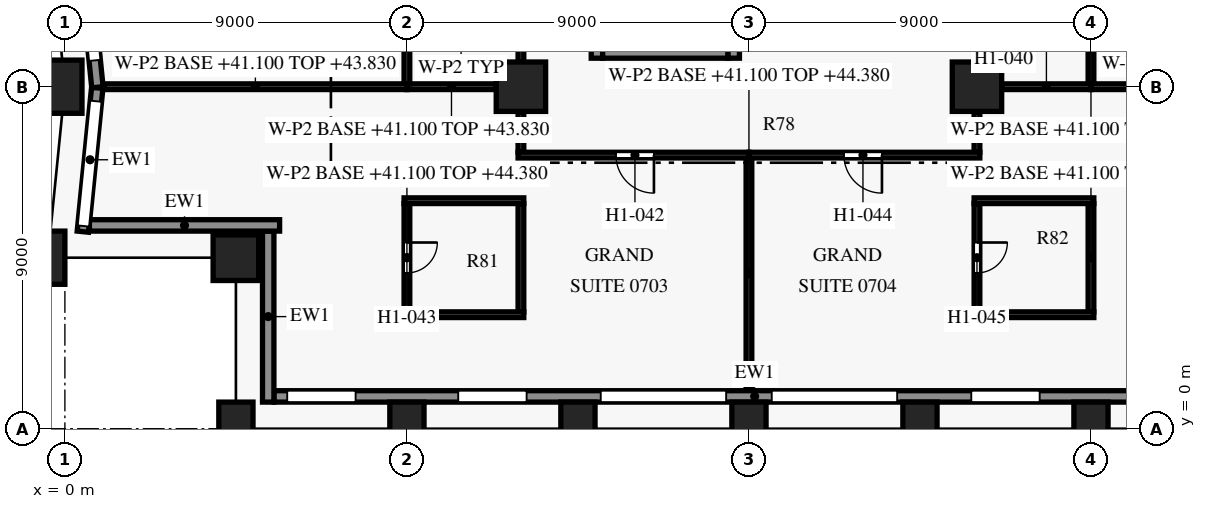
"""IFC4 building model, lengths in metres.
Left out: names, types, materials, properties, quantities, classifications, styles, units other than length and angle.
Written with IfcOpenShell. Run it as: python <this file> out.ifc"""

import sys

from ifc_helpers import new_model, si_unit, direction, frame, frame_2d, origin, origin_2d, place, context, subcontext, project, spatial, rectangle, extrude, element, fill, save


model = new_model("IFC4")
c1 = context("Model", 3, precision=1e-05, world=origin(), true_north=direction((0.0, 1.0)))
c2 = subcontext(c1, "Body", "Model", "MODEL_VIEW")
j1 = project(units=[si_unit("LENGTHUNIT", "METRE"), si_unit("PLANEANGLEUNIT", "RADIAN")], contexts=[c1])
p1 = place(None, origin())
s1 = spatial("IfcSite", under=j1, at=p1, CompositionType="ELEMENT")
p2 = place(p1, origin())
s2 = spatial("IfcBuilding", under=s1, at=p2, CompositionType="ELEMENT")
p3 = place(p2, frame((0.0, 0.0, 41.1)))
s3 = spatial("IfcBuildingStorey", under=s2, at=p3, CompositionType="ELEMENT", Elevation=41.1)
for number, where, z_axis, x_axis in (
    (1, (4.5, 0.0, 0.0), (0.0, 0.0, 1.0), (1.0, 0.0, 0.0)),
    (2, (9.0, 0.0, 0.0), (0.0, 0.0, 1.0), (1.0, 0.0, 0.0)),
    (3, (13.5, 0.0, 0.0), (0.0, 0.0, 1.0), (1.0, 0.0, 0.0)),
    (4, (18.0, 0.0, 0.0), (0.0, 0.0, 1.0), (1.0, 0.0, 0.0)),
    (5, (22.5, 0.0, 0.0), (0.0, 0.0, 1.0), (1.0, 0.0, 0.0)),
    (6, (27.0, 0.0, 0.0), (0.0, 0.0, 1.0), (1.0, 0.0, 0.0)),
    (7, (0.0, 9.0, 0.0), (0.0, 0.0, 1.0), (0.0, -1.0, 0.0)),
    (8, (-0.45, 4.5, 0.0), (0.0, 0.0, 1.0), (-0.1, -0.995, 0.0)),
):
    element("IfcColumn", number, at=place(p3, frame(where, z_axis=z_axis, x_axis=x_axis)), inside=s3, PredefinedType="COLUMN", context=c2, shape_type="SweptSolid", body=[
        extrude(rectangle(XDim=0.9, YDim=1.4, at=origin_2d()), origin(), (0.0, 0.0, 1.0), 3.6),
    ])
p4 = place(p3, frame((4.5, 4.5, 0.0), z_axis=(0.0, 0.0, 1.0), x_axis=(1.0, 0.0, 0.0)))
e9 = element("IfcColumn", 9, at=p4, inside=s3, PredefinedType="COLUMN", context=c2, shape_type="SweptSolid", body=[
    extrude(rectangle(XDim=1.2, YDim=1.2, at=origin_2d()), origin(), (0.0, 0.0, 1.0), 3.6),
])
for number, where, z_axis, x_axis in (
    (10, (12.0, 9.0, 0.0), (0.0, 0.0, 1.0), (1.0, 0.0, 0.0)),
    (11, (24.0, 9.0, 0.0), (0.0, 0.0, 1.0), (1.0, 0.0, 0.0)),
):
    element("IfcColumn", number, at=place(p3, frame(where, z_axis=z_axis, x_axis=x_axis)), inside=s3, PredefinedType="COLUMN", context=c2, shape_type="SweptSolid", body=[
        extrude(rectangle(XDim=1.3, YDim=1.3, at=origin_2d()), origin(), (0.0, 0.0, 1.0), 3.6),
    ])
p5 = place(p3, frame((30.8, 0.85, 0.0), z_axis=(0.0, 0.0, 1.0), x_axis=(-1.0, 0.0, 0.0)))
e12 = element("IfcWall", 12, at=p5, inside=s3, PredefinedType="SOLIDWALL", context=c2, shape_type="SweptSolid", body=[
    extrude(rectangle(XDim=25.3, YDim=0.3, at=frame_2d((12.65, 0.0))), origin(), (0.0, 0.0, 1.0), 2.95),
])
p6 = place(p5, frame((0.65, 0.0, 0.75)))
e13 = element("IfcOpeningElement", 13, at=p6, cuts=e12, PredefinedType="OPENING", context=c2, shape_type="SweptSolid", body=[
    extrude(rectangle(XDim=1.8, YDim=1.8, at=frame_2d((0.9, 0.9))), frame((0.0, 0.16, 0.0), z_axis=(0.0, -1.0, 0.0), x_axis=(1.0, 0.0, 0.0)), (0.0, 0.0, 1.0), 0.32),
])
p7 = place(p5, frame((5.15, 0.0, 0.75)))
e14 = element("IfcOpeningElement", 14, at=p7, cuts=e12, PredefinedType="OPENING", context=c2, shape_type="SweptSolid", body=[
    extrude(rectangle(XDim=1.8, YDim=1.8, at=frame_2d((0.9, 0.9))), frame((0.0, 0.16, 0.0), z_axis=(0.0, -1.0, 0.0), x_axis=(1.0, 0.0, 0.0)), (0.0, 0.0, 1.0), 0.32),
])
p8 = place(p5, frame((8.9, 0.0, 0.15)))
e15 = element("IfcOpeningElement", 15, at=p8, cuts=e12, PredefinedType="OPENING", context=c2, shape_type="SweptSolid", body=[
    extrude(rectangle(XDim=3.3, YDim=2.4, at=frame_2d((1.65, 1.2))), frame((0.0, 0.16, 0.0), z_axis=(0.0, -1.0, 0.0), x_axis=(1.0, 0.0, 0.0)), (0.0, 0.0, 1.0), 0.32),
])
p9 = place(p5, frame((13.4, 0.0, 0.15)))
e16 = element("IfcOpeningElement", 16, at=p9, cuts=e12, PredefinedType="OPENING", context=c2, shape_type="SweptSolid", body=[
    extrude(rectangle(XDim=3.3, YDim=2.4, at=frame_2d((1.65, 1.2))), frame((0.0, 0.16, 0.0), z_axis=(0.0, -1.0, 0.0), x_axis=(1.0, 0.0, 0.0)), (0.0, 0.0, 1.0), 0.32),
])
p10 = place(p5, frame((18.65, 0.0, 0.75)))
e17 = element("IfcOpeningElement", 17, at=p10, cuts=e12, PredefinedType="OPENING", context=c2, shape_type="SweptSolid", body=[
    extrude(rectangle(XDim=1.8, YDim=1.8, at=frame_2d((0.9, 0.9))), frame((0.0, 0.16, 0.0), z_axis=(0.0, -1.0, 0.0), x_axis=(1.0, 0.0, 0.0)), (0.0, 0.0, 1.0), 0.32),
])
p11 = place(p5, frame((23.15, 0.0, 0.75)))
e18 = element("IfcOpeningElement", 18, at=p11, cuts=e12, PredefinedType="OPENING", context=c2, shape_type="SweptSolid", body=[
    extrude(rectangle(XDim=1.8, YDim=1.8, at=frame_2d((0.9, 0.9))), frame((0.0, 0.16, 0.0), z_axis=(0.0, -1.0, 0.0), x_axis=(1.0, 0.0, 0.0)), (0.0, 0.0, 1.0), 0.32),
])
p12 = place(p3, frame((0.856, 8.985, 0.0), z_axis=(0.0, 0.0, 1.0), x_axis=(-0.099495688264, 0.995037993253, 0.0)))
e19 = element("IfcWall", 19, at=p12, inside=s3, PredefinedType="SOLIDWALL", context=c2, shape_type="SweptSolid", body=[
    extrude(rectangle(XDim=9.03, YDim=0.3, at=frame_2d((4.515, 0.0))), origin(), (0.0, 0.0, 1.0), 2.95),
])
p13 = place(p12, frame((0.711, 0.0, 0.15)))
e20 = element("IfcOpeningElement", 20, at=p13, cuts=e19, PredefinedType="OPENING", context=c2, shape_type="SweptSolid", body=[
    extrude(rectangle(XDim=3.3, YDim=2.4, at=frame_2d((1.65, 1.2))), frame((0.0, 0.16, 0.0), z_axis=(0.0, -1.0, 0.0), x_axis=(1.0, 0.0, 0.0)), (0.0, 0.0, 1.0), 0.32),
])
p14 = place(p12, frame((5.984, 0.0, 0.75)))
e21 = element("IfcOpeningElement", 21, at=p14, cuts=e19, PredefinedType="OPENING", context=c2, shape_type="SweptSolid", body=[
    extrude(rectangle(XDim=1.8, YDim=1.8, at=frame_2d((0.9, 0.9))), frame((0.0, 0.16, 0.0), z_axis=(0.0, -1.0, 0.0), x_axis=(1.0, 0.0, 0.0)), (0.0, 0.0, 1.0), 0.32),
])
p15 = place(p3, frame((0.473, 5.185, 0.0), z_axis=(0.0, 0.0, 1.0), x_axis=(0.099541845169, 0.995033376857, 0.0)))
e22 = element("IfcWall", 22, at=p15, inside=s3, PredefinedType="SOLIDWALL", context=c2, shape_type="SweptSolid", body=[
    extrude(rectangle(XDim=3.804, YDim=0.3, at=frame_2d((1.902, 0.0))), origin(), (0.0, 0.0, 1.0), 2.95),
])
p16 = place(p15, frame((0.15, 0.0, 0.15)))
e23 = element("IfcOpeningElement", 23, at=p16, cuts=e22, PredefinedType="OPENING", context=c2, shape_type="SweptSolid", body=[
    extrude(rectangle(XDim=3.3, YDim=2.4, at=frame_2d((1.65, 1.2))), frame((0.0, 0.16, 0.0), z_axis=(0.0, -1.0, 0.0), x_axis=(1.0, 0.0, 0.0)), (0.0, 0.0, 1.0), 0.32),
])
p17 = place(p3, frame((5.65, 5.35, 0.0), z_axis=(0.0, 0.0, 1.0), x_axis=(-1.0, 0.0, 0.0)))
e24 = element("IfcWall", 24, at=p17, inside=s3, PredefinedType="SOLIDWALL", context=c2, shape_type="SweptSolid", body=[
    extrude(rectangle(XDim=5.005, YDim=0.3, at=frame_2d((2.502, 0.0))), origin(), (0.0, 0.0, 1.0), 2.95),
])
p18 = place(p3, frame((5.35, 0.7, 0.0), z_axis=(0.0, 0.0, 1.0), x_axis=(0.0, 1.0, 0.0)))
e25 = element("IfcWall", 25, at=p18, inside=s3, PredefinedType="SOLIDWALL", context=c2, shape_type="SweptSolid", body=[
    extrude(rectangle(XDim=4.5, YDim=0.3, at=frame_2d((2.25, 0.0))), origin(), (0.0, 0.0, 1.0), 2.95),
])
p19 = place(p3, frame((14.15, 9.9, 0.0), z_axis=(0.0, 0.0, 1.0), x_axis=(1.0, 0.0, 0.0)))
e26 = element("IfcWall", 26, at=p19, inside=s3, PredefinedType="SHEAR", context=c2, shape_type="SweptSolid", body=[
    extrude(rectangle(XDim=3.3, YDim=0.3, at=frame_2d((1.65, 0.0))), origin(), (0.0, 0.0, 1.0), 3.3),
])
p20 = place(p3, frame((14.0, 9.75, 0.0), z_axis=(0.0, 0.0, 1.0), x_axis=(0.0, 1.0, 0.0)))
e27 = element("IfcWall", 27, at=p20, inside=s3, PredefinedType="SHEAR", context=c2, shape_type="SweptSolid", body=[
    extrude(rectangle(XDim=8.3, YDim=0.3, at=frame_2d((4.15, 0.0))), origin(), (0.0, 0.0, 1.0), 3.3),
])
p21 = place(p3, frame((17.6, 9.75, 0.0), z_axis=(0.0, 0.0, 1.0), x_axis=(0.0, 1.0, 0.0)))
e28 = element("IfcWall", 28, at=p21, inside=s3, PredefinedType="SHEAR", context=c2, shape_type="SweptSolid", body=[
    extrude(rectangle(XDim=8.3, YDim=0.3, at=frame_2d((4.15, 0.0))), origin(), (0.0, 0.0, 1.0), 3.3),
])
p22 = place(p21, frame((0.65, 0.0, 0.0)))
e29 = element("IfcOpeningElement", 29, at=p22, cuts=e28, PredefinedType="OPENING", context=c2, shape_type="SweptSolid", body=[
    extrude(rectangle(XDim=1.2, YDim=2.2, at=frame_2d((0.6, 1.1))), frame((0.0, 0.16, 0.0), z_axis=(0.0, -1.0, 0.0), x_axis=(1.0, 0.0, 0.0)), (0.0, 0.0, 1.0), 0.32),
])
for number, where, z_axis, x_axis in (
    (30, (8.925, 3.0, 0.0), (0.0, 0.0, 1.0), (1.0, 0.0, 0.0)),
    (31, (23.925, 3.0, 0.0), (0.0, 0.0, 1.0), (1.0, 0.0, 0.0)),
):
    element("IfcWall", number, at=place(p3, frame(where, z_axis=z_axis, x_axis=x_axis)), inside=s3, PredefinedType="PARTITIONING", context=c2, shape_type="SweptSolid", body=[
        extrude(rectangle(XDim=3.15, YDim=0.15, at=frame_2d((1.575, 0.0))), origin(), (0.0, 0.0, 1.0), 2.58),
    ])
p23 = place(p3, frame((12.0, 3.075, 0.0), z_axis=(0.0, 0.0, 1.0), x_axis=(0.0, 1.0, 0.0)))
e32 = element("IfcWall", 32, at=p23, inside=s3, PredefinedType="PARTITIONING", context=c2, shape_type="SweptSolid", body=[
    extrude(rectangle(XDim=2.85, YDim=0.15, at=frame_2d((1.425, 0.0))), origin(), (0.0, 0.0, 1.0), 2.58),
])
p24 = place(p3, frame((27.0, 3.075, 0.0), z_axis=(0.0, 0.0, 1.0), x_axis=(0.0, 1.0, 0.0)))
e33 = element("IfcWall", 33, at=p24, inside=s3, PredefinedType="PARTITIONING", context=c2, shape_type="SweptSolid", body=[
    extrude(rectangle(XDim=2.85, YDim=0.15, at=frame_2d((1.425, 0.0))), origin(), (0.0, 0.0, 1.0), 3.28),
])
p25 = place(p3, frame((9.0, 5.925, 0.0), z_axis=(0.0, 0.0, 1.0), x_axis=(0.0, -1.0, 0.0)))
e34 = element("IfcWall", 34, at=p25, inside=s3, PredefinedType="PARTITIONING", context=c2, shape_type="SweptSolid", body=[
    extrude(rectangle(XDim=2.85, YDim=0.15, at=frame_2d((1.425, 0.0))), origin(), (0.0, 0.0, 1.0), 3.28),
])
p26 = place(p25, frame((1.025, 0.0, 0.0)))
e35 = element("IfcOpeningElement", 35, at=p26, cuts=e34, PredefinedType="OPENING", context=c2, shape_type="SweptSolid", body=[
    extrude(rectangle(XDim=0.8, YDim=2.1, at=frame_2d((0.4, 1.05))), frame((0.0, 0.085, 0.0), z_axis=(0.0, -1.0, 0.0), x_axis=(1.0, 0.0, 0.0)), (0.0, 0.0, 1.0), 0.17),
])
p27 = place(p3, frame((24.0, 5.925, 0.0), z_axis=(0.0, 0.0, 1.0), x_axis=(0.0, -1.0, 0.0)))
e36 = element("IfcWall", 36, at=p27, inside=s3, PredefinedType="PARTITIONING", context=c2, shape_type="SweptSolid", body=[
    extrude(rectangle(XDim=2.85, YDim=0.15, at=frame_2d((1.425, 0.0))), origin(), (0.0, 0.0, 1.0), 2.58),
])
p28 = place(p27, frame((1.025, 0.0, 0.0)))
e37 = element("IfcOpeningElement", 37, at=p28, cuts=e36, PredefinedType="OPENING", context=c2, shape_type="SweptSolid", body=[
    extrude(rectangle(XDim=0.8, YDim=2.1, at=frame_2d((0.4, 1.05))), frame((0.0, 0.085, 0.0), z_axis=(0.0, -1.0, 0.0), x_axis=(1.0, 0.0, 0.0)), (0.0, 0.0, 1.0), 0.17),
])
for number, where, z_axis, x_axis in (
    (38, (12.075, 6.0, 0.0), (0.0, 0.0, 1.0), (-1.0, 0.0, 0.0)),
    (39, (27.075, 6.0, 0.0), (0.0, 0.0, 1.0), (-1.0, 0.0, 0.0)),
):
    element("IfcWall", number, at=place(p3, frame(where, z_axis=z_axis, x_axis=x_axis)), inside=s3, PredefinedType="PARTITIONING", context=c2, shape_type="SweptSolid", body=[
        extrude(rectangle(XDim=3.15, YDim=0.15, at=frame_2d((1.575, 0.0))), origin(), (0.0, 0.0, 1.0), 2.58),
    ])
p29 = place(p3, frame((18.0, 7.125, 0.0), z_axis=(0.0, 0.0, 1.0), x_axis=(0.0, -1.0, 0.0)))
e40 = element("IfcWall", 40, at=p29, inside=s3, PredefinedType="PARTITIONING", context=c2, shape_type="SweptSolid", body=[
    extrude(rectangle(XDim=6.105, YDim=0.15, at=frame_2d((3.052, 0.0))), origin(), (0.0, 0.0, 1.0), 3.28),
])
p30 = place(p3, frame((18.0, 7.2, 0.0), z_axis=(0.0, 0.0, 1.0), x_axis=(-1.0, 0.0, 0.0)))
e41 = element("IfcWall", 41, at=p30, inside=s3, PredefinedType="PARTITIONING", context=c2, shape_type="SweptSolid", body=[
    extrude(rectangle(XDim=6.075, YDim=0.15, at=frame_2d((3.038, 0.0))), origin(), (0.0, 0.0, 1.0), 2.58),
])
p31 = place(p30, frame((2.5, 0.0, 0.0)))
e42 = element("IfcOpeningElement", 42, at=p31, cuts=e41, PredefinedType="OPENING", context=c2, shape_type="SweptSolid", body=[
    extrude(rectangle(XDim=1.0, YDim=2.1, at=frame_2d((0.5, 1.05))), frame((0.0, 0.085, 0.0), z_axis=(0.0, -1.0, 0.0), x_axis=(1.0, 0.0, 0.0)), (0.0, 0.0, 1.0), 0.17),
])
p32 = place(p3, frame((24.075, 7.2, 0.0), z_axis=(0.0, 0.0, 1.0), x_axis=(-1.0, 0.0, 0.0)))
e43 = element("IfcWall", 43, at=p32, inside=s3, PredefinedType="PARTITIONING", context=c2, shape_type="SweptSolid", body=[
    extrude(rectangle(XDim=6.075, YDim=0.15, at=frame_2d((3.038, 0.0))), origin(), (0.0, 0.0, 1.0), 2.58),
])
p33 = place(p32, frame((2.575, 0.0, 0.0)))
e44 = element("IfcOpeningElement", 44, at=p33, cuts=e43, PredefinedType="OPENING", context=c2, shape_type="SweptSolid", body=[
    extrude(rectangle(XDim=1.0, YDim=2.1, at=frame_2d((0.5, 1.05))), frame((0.0, 0.085, 0.0), z_axis=(0.0, -1.0, 0.0), x_axis=(1.0, 0.0, 0.0)), (0.0, 0.0, 1.0), 0.17),
])
for number, where, z_axis, x_axis in (
    (45, (12.0, 7.275, 0.0), (0.0, 0.0, 1.0), (0.0, 1.0, 0.0)),
    (46, (24.0, 8.345, 0.0), (0.0, 0.0, 1.0), (0.0, -1.0, 0.0)),
):
    element("IfcWall", number, at=place(p3, frame(where, z_axis=z_axis, x_axis=x_axis)), inside=s3, PredefinedType="PARTITIONING", context=c2, shape_type="SweptSolid", body=[
        extrude(rectangle(XDim=1.07, YDim=0.15, at=frame_2d((0.535, 0.0))), origin(), (0.0, 0.0, 1.0), 2.58),
    ])
p34 = place(p3, frame((9.0, 9.0, 0.0), z_axis=(0.0, 0.0, 1.0), x_axis=(-1.0, 0.0, 0.0)))
e47 = element("IfcWall", 47, at=p34, inside=s3, PredefinedType="PARTITIONING", context=c2, shape_type="SweptSolid", body=[
    extrude(rectangle(XDim=7.975, YDim=0.15, at=frame_2d((3.988, 0.0))), origin(), (0.0, 0.0, 1.0), 2.73),
])
for number, where, z_axis, x_axis in (
    (48, (11.345, 9.0, 0.0), (0.0, 0.0, 1.0), (-1.0, 0.0, 0.0)),
    (49, (27.0, 9.0, 0.0), (0.0, 0.0, 1.0), (-1.0, 0.0, 0.0)),
):
    element("IfcWall", number, at=place(p3, frame(where, z_axis=z_axis, x_axis=x_axis)), inside=s3, PredefinedType="PARTITIONING", context=c2, shape_type="SweptSolid", body=[
        extrude(rectangle(XDim=2.345, YDim=0.15, at=frame_2d((1.172, 0.0))), origin(), (0.0, 0.0, 1.0), 2.73),
    ])
p35 = place(p3, frame((34.975, 9.0, 0.0), z_axis=(0.0, 0.0, 1.0), x_axis=(-1.0, 0.0, 0.0)))
e50 = element("IfcWall", 50, at=p35, inside=s3, PredefinedType="PARTITIONING", context=c2, shape_type="SweptSolid", body=[
    extrude(rectangle(XDim=7.975, YDim=0.15, at=frame_2d((3.988, 0.0))), origin(), (0.0, 0.0, 1.0), 2.73),
])
p36 = place(p3, frame((27.0, 9.075, 0.0), z_axis=(0.0, 0.0, 1.0), x_axis=(0.0, 1.0, 0.0)))
e51 = element("IfcWall", 51, at=p36, inside=s3, PredefinedType="PARTITIONING", context=c2, shape_type="SweptSolid", body=[
    extrude(rectangle(XDim=1.95, YDim=0.15, at=frame_2d((0.975, 0.0))), origin(), (0.0, 0.0, 1.0), 2.73),
])
p37 = place(p3, frame((12.0, 9.655, 0.0), z_axis=(0.0, 0.0, 1.0), x_axis=(0.0, 1.0, 0.0)))
e52 = element("IfcWall", 52, at=p37, inside=s3, PredefinedType="PARTITIONING", context=c2, shape_type="SweptSolid", body=[
    extrude(rectangle(XDim=1.37, YDim=0.15, at=frame_2d((0.685, 0.0))), origin(), (0.0, 0.0, 1.0), 2.58),
])
p38 = place(p3, frame((9.0, 11.025, 0.0), z_axis=(0.0, 0.0, 1.0), x_axis=(0.0, -1.0, 0.0)))
e53 = element("IfcWall", 53, at=p38, inside=s3, PredefinedType="PARTITIONING", context=c2, shape_type="SweptSolid", body=[
    extrude(rectangle(XDim=1.95, YDim=0.15, at=frame_2d((0.975, 0.0))), origin(), (0.0, 0.0, 1.0), 2.73),
])
p39 = place(p3, frame((24.0, 11.025, 0.0), z_axis=(0.0, 0.0, 1.0), x_axis=(0.0, -1.0, 0.0)))
e54 = element("IfcWall", 54, at=p39, inside=s3, PredefinedType="PARTITIONING", context=c2, shape_type="SweptSolid", body=[
    extrude(rectangle(XDim=1.37, YDim=0.15, at=frame_2d((0.685, 0.0))), origin(), (0.0, 0.0, 1.0), 2.58),
])
p40 = place(p7, origin())
e55 = element("IfcWindow", 55, at=p40, inside=s3, PartitioningType="SINGLE_PANEL", PredefinedType="WINDOW", context=c2, shape_type="SweptSolid", body=[
    extrude(rectangle(XDim=1.8, YDim=1.8, at=frame_2d((0.9, 0.9))), frame((0.0, 0.03, 0.0), z_axis=(0.0, -1.0, 0.0), x_axis=(1.0, 0.0, 0.0)), (0.0, 0.0, 1.0), 0.06),
])
fill(e14, e55)
p41 = place(p8, origin())
e56 = element("IfcWindow", 56, at=p41, inside=s3, PartitioningType="SINGLE_PANEL", PredefinedType="WINDOW", context=c2, shape_type="SweptSolid", body=[
    extrude(rectangle(XDim=3.3, YDim=2.4, at=frame_2d((1.65, 1.2))), frame((0.0, 0.03, 0.0), z_axis=(0.0, -1.0, 0.0), x_axis=(1.0, 0.0, 0.0)), (0.0, 0.0, 1.0), 0.06),
])
fill(e15, e56)
p42 = place(p9, origin())
e57 = element("IfcWindow", 57, at=p42, inside=s3, PartitioningType="SINGLE_PANEL", PredefinedType="WINDOW", context=c2, shape_type="SweptSolid", body=[
    extrude(rectangle(XDim=3.3, YDim=2.4, at=frame_2d((1.65, 1.2))), frame((0.0, 0.03, 0.0), z_axis=(0.0, -1.0, 0.0), x_axis=(1.0, 0.0, 0.0)), (0.0, 0.0, 1.0), 0.06),
])
fill(e16, e57)
p43 = place(p10, origin())
e58 = element("IfcWindow", 58, at=p43, inside=s3, PartitioningType="SINGLE_PANEL", PredefinedType="WINDOW", context=c2, shape_type="SweptSolid", body=[
    extrude(rectangle(XDim=1.8, YDim=1.8, at=frame_2d((0.9, 0.9))), frame((0.0, 0.03, 0.0), z_axis=(0.0, -1.0, 0.0), x_axis=(1.0, 0.0, 0.0)), (0.0, 0.0, 1.0), 0.06),
])
fill(e17, e58)
p44 = place(p11, origin())
e59 = element("IfcWindow", 59, at=p44, inside=s3, PartitioningType="SINGLE_PANEL", PredefinedType="WINDOW", context=c2, shape_type="SweptSolid", body=[
    extrude(rectangle(XDim=1.8, YDim=1.8, at=frame_2d((0.9, 0.9))), frame((0.0, 0.03, 0.0), z_axis=(0.0, -1.0, 0.0), x_axis=(1.0, 0.0, 0.0)), (0.0, 0.0, 1.0), 0.06),
])
fill(e18, e59)
p45 = place(p13, origin())
e60 = element("IfcWindow", 60, at=p45, inside=s3, PartitioningType="SINGLE_PANEL", PredefinedType="WINDOW", context=c2, shape_type="SweptSolid", body=[
    extrude(rectangle(XDim=3.3, YDim=2.4, at=frame_2d((1.65, 1.2))), frame((0.0, 0.03, 0.0), z_axis=(0.0, -1.0, 0.0), x_axis=(1.0, 0.0, 0.0)), (0.0, 0.0, 1.0), 0.06),
])
fill(e20, e60)
p46 = place(p16, origin())
e61 = element("IfcWindow", 61, at=p46, inside=s3, PartitioningType="SINGLE_PANEL", PredefinedType="WINDOW", context=c2, shape_type="SweptSolid", body=[
    extrude(rectangle(XDim=3.3, YDim=2.4, at=frame_2d((1.65, 1.2))), frame((0.0, 0.03, 0.0), z_axis=(0.0, -1.0, 0.0), x_axis=(1.0, 0.0, 0.0)), (0.0, 0.0, 1.0), 0.06),
])
fill(e23, e61)
p47 = place(p31, origin())
e62 = element("IfcDoor", 62, at=p47, inside=s3, OperationType="SINGLE_SWING_LEFT", PredefinedType="DOOR", context=c2, shape_type="SweptSolid", body=[
    extrude(rectangle(XDim=1.0, YDim=2.1, at=frame_2d((0.5, 1.05))), frame((0.0, 0.025, 0.0), z_axis=(0.0, -1.0, 0.0), x_axis=(1.0, 0.0, 0.0)), (0.0, 0.0, 1.0), 0.05),
])
fill(e42, e62)
p48 = place(p26, origin())
e63 = element("IfcDoor", 63, at=p48, inside=s3, OperationType="SINGLE_SWING_RIGHT", PredefinedType="DOOR", context=c2, shape_type="SweptSolid", body=[
    extrude(rectangle(XDim=0.8, YDim=2.1, at=frame_2d((0.4, 1.05))), frame((0.0, 0.025, 0.0), z_axis=(0.0, -1.0, 0.0), x_axis=(1.0, 0.0, 0.0)), (0.0, 0.0, 1.0), 0.05),
])
fill(e35, e63)
p49 = place(p33, origin())
e64 = element("IfcDoor", 64, at=p49, inside=s3, OperationType="SINGLE_SWING_LEFT", PredefinedType="DOOR", context=c2, shape_type="SweptSolid", body=[
    extrude(rectangle(XDim=1.0, YDim=2.1, at=frame_2d((0.5, 1.05))), frame((0.0, 0.025, 0.0), z_axis=(0.0, -1.0, 0.0), x_axis=(1.0, 0.0, 0.0)), (0.0, 0.0, 1.0), 0.05),
])
fill(e44, e64)
p50 = place(p28, origin())
e65 = element("IfcDoor", 65, at=p50, inside=s3, OperationType="SINGLE_SWING_RIGHT", PredefinedType="DOOR", context=c2, shape_type="SweptSolid", body=[
    extrude(rectangle(XDim=0.8, YDim=2.1, at=frame_2d((0.4, 1.05))), frame((0.0, 0.025, 0.0), z_axis=(0.0, -1.0, 0.0), x_axis=(1.0, 0.0, 0.0)), (0.0, 0.0, 1.0), 0.05),
])
fill(e37, e65)
save(model, sys.argv[1])
